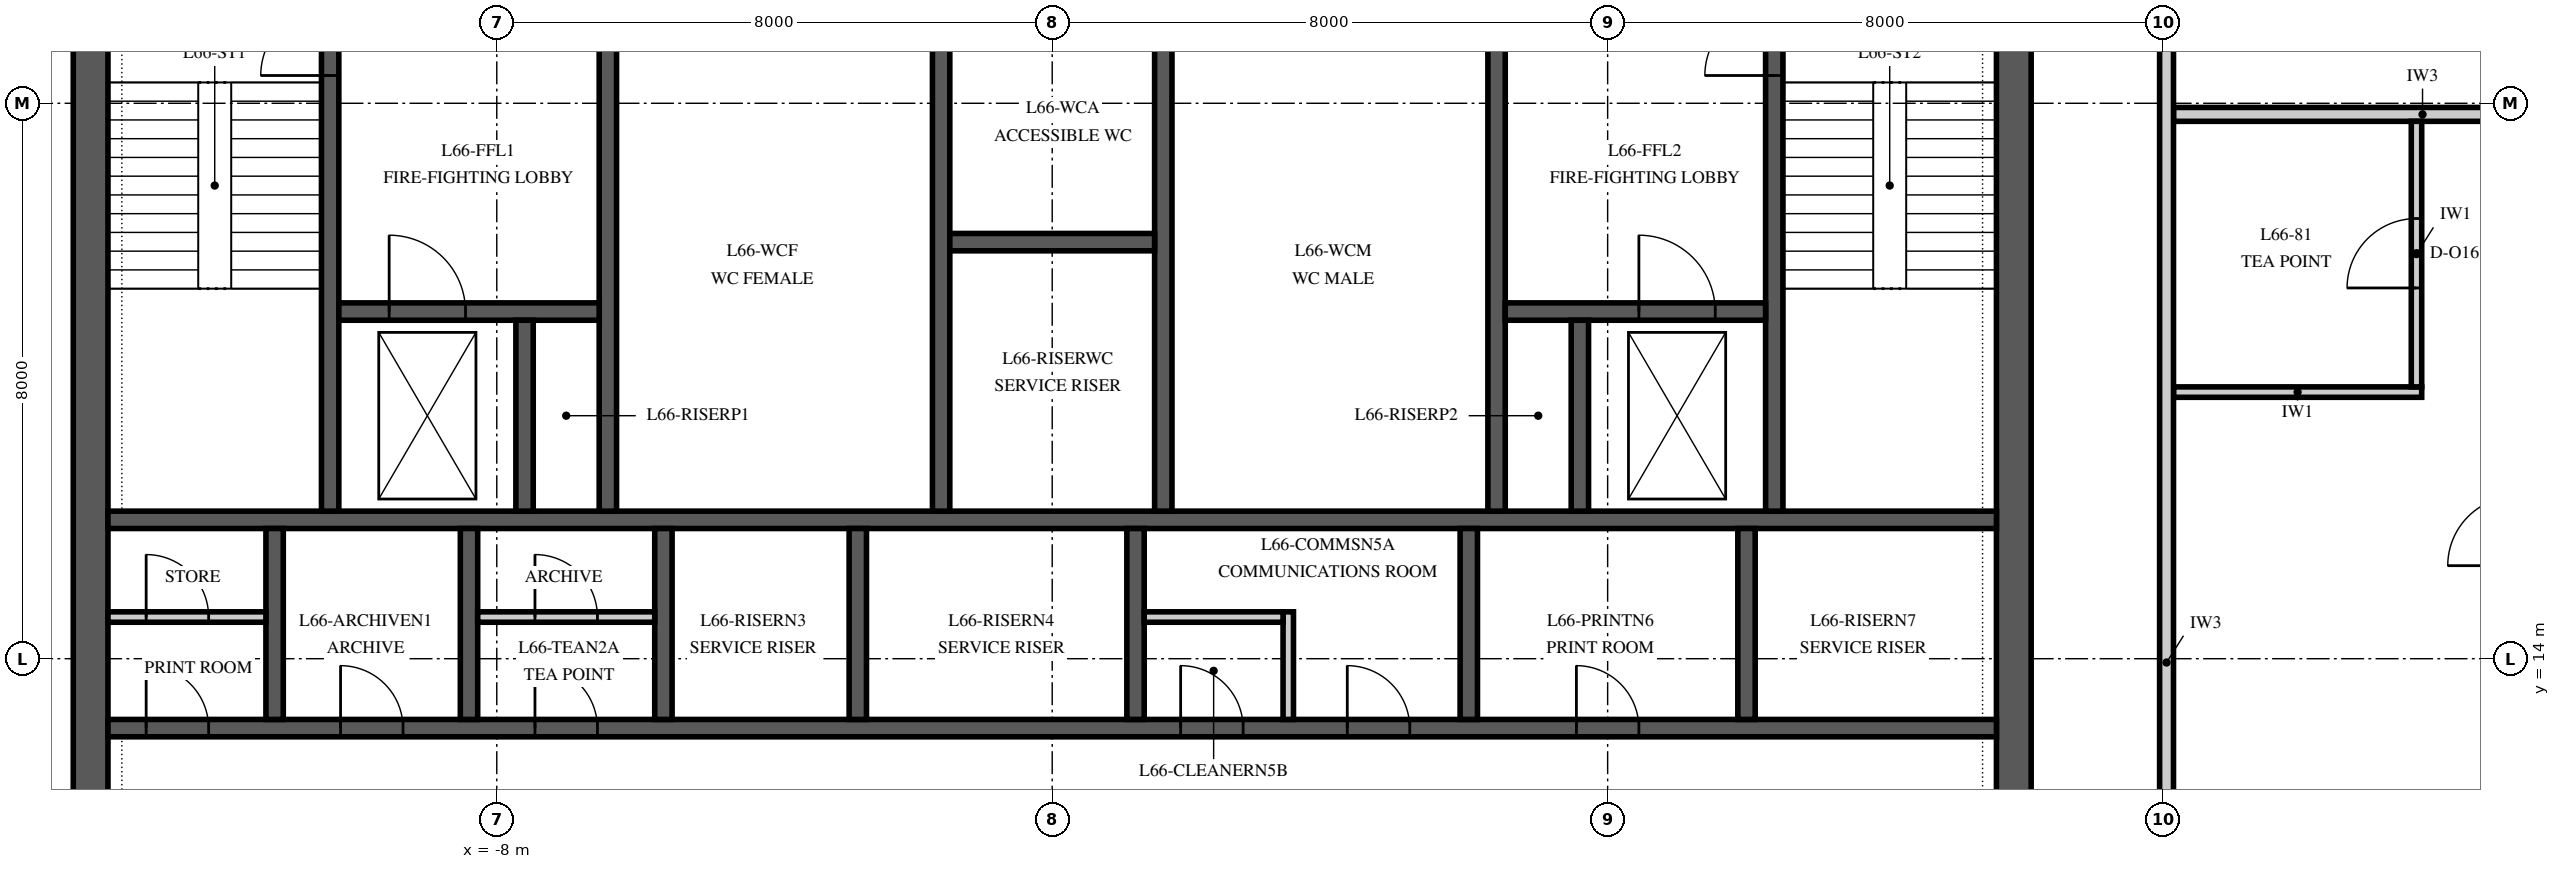
"""IFC4 building model, lengths in metres.
Left out: names, types, materials, properties, quantities, classifications, styles, units other than length and angle.
Written with IfcOpenShell. Run it as: python <this file> out.ifc"""

import sys

from ifc_helpers import new_model, si_unit, direction, frame, frame_2d, origin, place, context, subcontext, project, spatial, polyline, rectangle, outline, extrude, element, fill, save


model = new_model("IFC4")
c1 = context("Model", 3, precision=1e-05, world=origin(), true_north=direction((0.0, 1.0)))
c2 = subcontext(c1, "Body", "Model", "MODEL_VIEW")
j1 = project(units=[si_unit("LENGTHUNIT", "METRE"), si_unit("PLANEANGLEUNIT", "RADIAN")], contexts=[c1])
p1 = place(None, origin())
s1 = spatial("IfcSite", under=j1, at=p1, CompositionType="ELEMENT")
p2 = place(p1, origin())
s2 = spatial("IfcBuilding", under=s1, at=p2, CompositionType="ELEMENT")
p3 = place(p2, frame((0.0, 0.0, 284.0)))
s3 = spatial("IfcBuildingStorey", under=s2, at=p3, CompositionType="ELEMENT", Elevation=284.0)
p4 = place(p3, frame((13.85, 6.15, 0.0), z_axis=(0.0, 0.0, 1.0), x_axis=(0.0, 1.0, 0.0)))
e1 = element("IfcWall", 1, at=p4, inside=s3, PredefinedType="SHEAR", context=c2, shape_type="SweptSolid", body=[
    extrude(outline(polyline([(0.0, -0.25), (17.7, -0.25), (17.7, 0.0), (17.45, 0.0), (17.45, 0.25), (0.25, 0.25), (0.25, 0.0), (0.0, 0.0), (0.0, -0.25)])), origin(), (0.0, 0.0, 1.0), 4.0),
])
p5 = place(p4, frame((4.15, 0.0, 0.0)))
e2 = element("IfcOpeningElement", 2, at=p5, cuts=e1, PredefinedType="OPENING", context=c2, shape_type="SweptSolid", body=[
    extrude(rectangle(XDim=1.8, YDim=2.4, at=frame_2d((0.9, 1.2))), frame((0.0, 0.265, 0.0), z_axis=(0.0, -1.0, 0.0), x_axis=(1.0, 0.0, 0.0)), (0.0, 0.0, 1.0), 0.53),
])
p6 = place(p3, frame((-13.85, 23.85, 0.0), z_axis=(0.0, 0.0, 1.0), x_axis=(0.0, -1.0, 0.0)))
e3 = element("IfcWall", 3, at=p6, inside=s3, PredefinedType="SHEAR", context=c2, shape_type="SweptSolid", body=[
    extrude(outline(polyline([(0.0, -0.25), (17.7, -0.25), (17.7, 0.0), (17.45, 0.0), (17.45, 0.25), (0.25, 0.25), (0.25, 0.0), (0.0, 0.0), (0.0, -0.25)])), origin(), (0.0, 0.0, 1.0), 4.0),
])
p7 = place(p6, frame((11.75, 0.0, 0.0)))
e4 = element("IfcOpeningElement", 4, at=p7, cuts=e3, PredefinedType="OPENING", context=c2, shape_type="SweptSolid", body=[
    extrude(rectangle(XDim=1.8, YDim=2.4, at=frame_2d((0.9, 1.2))), frame((0.0, 0.265, 0.0), z_axis=(0.0, -1.0, 0.0), x_axis=(1.0, 0.0, 0.0)), (0.0, 0.0, 1.0), 0.53),
])
p8 = place(p3, frame((-13.6, 13.0, 0.0), z_axis=(0.0, 0.0, 1.0), x_axis=(1.0, 0.0, 0.0)))
e5 = element("IfcWall", 5, at=p8, inside=s3, PredefinedType="SHEAR", context=c2, shape_type="SweptSolid", body=[
    extrude(rectangle(XDim=27.2, YDim=0.25, at=frame_2d((13.6, 0.0))), origin(), (0.0, 0.0, 1.0), 4.0),
])
p9 = place(p8, frame((17.85, 0.0, 0.0)))
e6 = element("IfcOpeningElement", 6, at=p9, cuts=e5, PredefinedType="OPENING", context=c2, shape_type="SweptSolid", body=[
    extrude(rectangle(XDim=0.9, YDim=2.1, at=frame_2d((0.45, 1.05))), frame((0.0, 0.14, 0.0), z_axis=(0.0, -1.0, 0.0), x_axis=(1.0, 0.0, 0.0)), (0.0, 0.0, 1.0), 0.28),
])
p10 = place(p8, frame((15.45, 0.0, 0.0)))
e7 = element("IfcOpeningElement", 7, at=p10, cuts=e5, PredefinedType="OPENING", context=c2, shape_type="SweptSolid", body=[
    extrude(rectangle(XDim=0.9, YDim=2.1, at=frame_2d((0.45, 1.05))), frame((0.0, 0.14, 0.0), z_axis=(0.0, -1.0, 0.0), x_axis=(1.0, 0.0, 0.0)), (0.0, 0.0, 1.0), 0.28),
])
p11 = place(p8, frame((21.15, 0.0, 0.0)))
e8 = element("IfcOpeningElement", 8, at=p11, cuts=e5, PredefinedType="OPENING", context=c2, shape_type="SweptSolid", body=[
    extrude(rectangle(XDim=0.9, YDim=2.1, at=frame_2d((0.45, 1.05))), frame((0.0, 0.14, 0.0), z_axis=(0.0, -1.0, 0.0), x_axis=(1.0, 0.0, 0.0)), (0.0, 0.0, 1.0), 0.28),
])
p12 = place(p8, frame((0.55, 0.0, 0.0)))
e9 = element("IfcOpeningElement", 9, at=p12, cuts=e5, PredefinedType="OPENING", context=c2, shape_type="SweptSolid", body=[
    extrude(rectangle(XDim=0.9, YDim=2.1, at=frame_2d((0.45, 1.05))), frame((0.0, 0.14, 0.0), z_axis=(0.0, -1.0, 0.0), x_axis=(1.0, 0.0, 0.0)), (0.0, 0.0, 1.0), 0.28),
])
p13 = place(p8, frame((3.35, 0.0, 0.0)))
e10 = element("IfcOpeningElement", 10, at=p13, cuts=e5, PredefinedType="OPENING", context=c2, shape_type="SweptSolid", body=[
    extrude(rectangle(XDim=0.9, YDim=2.1, at=frame_2d((0.45, 1.05))), frame((0.0, 0.14, 0.0), z_axis=(0.0, -1.0, 0.0), x_axis=(1.0, 0.0, 0.0)), (0.0, 0.0, 1.0), 0.28),
])
p14 = place(p8, frame((6.15, 0.0, 0.0)))
e11 = element("IfcOpeningElement", 11, at=p14, cuts=e5, PredefinedType="OPENING", context=c2, shape_type="SweptSolid", body=[
    extrude(rectangle(XDim=0.9, YDim=2.1, at=frame_2d((0.45, 1.05))), frame((0.0, 0.14, 0.0), z_axis=(0.0, -1.0, 0.0), x_axis=(1.0, 0.0, 0.0)), (0.0, 0.0, 1.0), 0.28),
])
p15 = place(p3, frame((-13.6, 16.0, 0.0), z_axis=(0.0, 0.0, 1.0), x_axis=(1.0, 0.0, 0.0)))
e12 = element("IfcWall", 12, at=p15, inside=s3, PredefinedType="SHEAR", context=c2, shape_type="SweptSolid", body=[
    extrude(rectangle(XDim=27.2, YDim=0.25, at=frame_2d((13.6, 0.0))), origin(), (0.0, 0.0, 1.0), 4.0),
])
for number, where, z_axis, x_axis in (
    (13, (-11.2, 13.125, 0.0), (0.0, 0.0, 1.0), (0.0, 1.0, 0.0)),
    (14, (-8.4, 13.125, 0.0), (0.0, 0.0, 1.0), (0.0, 1.0, 0.0)),
    (15, (-5.6, 13.125, 0.0), (0.0, 0.0, 1.0), (0.0, 1.0, 0.0)),
    (16, (-2.8, 13.125, 0.0), (0.0, 0.0, 1.0), (0.0, 1.0, 0.0)),
    (17, (1.2, 13.125, 0.0), (0.0, 0.0, 1.0), (0.0, 1.0, 0.0)),
    (18, (6.0, 13.125, 0.0), (0.0, 0.0, 1.0), (0.0, 1.0, 0.0)),
    (19, (10.0, 13.125, 0.0), (0.0, 0.0, 1.0), (0.0, 1.0, 0.0)),
):
    element("IfcWall", number, at=place(p3, frame(where, z_axis=z_axis, x_axis=x_axis)), inside=s3, PredefinedType="SHEAR", context=c2, shape_type="SweptSolid", body=[
        extrude(rectangle(XDim=2.75, YDim=0.25, at=frame_2d((1.375, 0.0))), origin(), (0.0, 0.0, 1.0), 4.0),
    ])
p16 = place(p3, frame((-10.4, 16.125, 0.0), z_axis=(0.0, 0.0, 1.0), x_axis=(0.0, 1.0, 0.0)))
e20 = element("IfcWall", 20, at=p16, inside=s3, PredefinedType="SHEAR", context=c2, shape_type="SweptSolid", body=[
    extrude(rectangle(XDim=7.475, YDim=0.25, at=frame_2d((3.738, 0.0))), origin(), (0.0, 0.0, 1.0), 4.0),
])
p17 = place(p16, frame((6.275, 0.0, 0.0)))
e21 = element("IfcOpeningElement", 21, at=p17, cuts=e20, PredefinedType="OPENING", context=c2, shape_type="SweptSolid", body=[
    extrude(rectangle(XDim=1.0, YDim=2.1, at=frame_2d((0.5, 1.05))), frame((0.0, 0.14, 0.0), z_axis=(0.0, -1.0, 0.0), x_axis=(1.0, 0.0, 0.0)), (0.0, 0.0, 1.0), 0.28),
])
for number, where, z_axis, x_axis in (
    (22, (-6.4, 16.125, 0.0), (0.0, 0.0, 1.0), (0.0, 1.0, 0.0)),
    (23, (-1.6, 16.125, 0.0), (0.0, 0.0, 1.0), (0.0, 1.0, 0.0)),
    (24, (1.6, 16.125, 0.0), (0.0, 0.0, 1.0), (0.0, 1.0, 0.0)),
    (25, (6.4, 16.125, 0.0), (0.0, 0.0, 1.0), (0.0, 1.0, 0.0)),
):
    element("IfcWall", number, at=place(p3, frame(where, z_axis=z_axis, x_axis=x_axis)), inside=s3, PredefinedType="SHEAR", context=c2, shape_type="SweptSolid", body=[
        extrude(rectangle(XDim=7.475, YDim=0.25, at=frame_2d((3.738, 0.0))), origin(), (0.0, 0.0, 1.0), 4.0),
    ])
p18 = place(p3, frame((10.4, 16.125, 0.0), z_axis=(0.0, 0.0, 1.0), x_axis=(0.0, 1.0, 0.0)))
e26 = element("IfcWall", 26, at=p18, inside=s3, PredefinedType="SHEAR", context=c2, shape_type="SweptSolid", body=[
    extrude(rectangle(XDim=7.475, YDim=0.25, at=frame_2d((3.738, 0.0))), origin(), (0.0, 0.0, 1.0), 4.0),
])
p19 = place(p18, frame((6.275, 0.0, 0.0)))
e27 = element("IfcOpeningElement", 27, at=p19, cuts=e26, PredefinedType="OPENING", context=c2, shape_type="SweptSolid", body=[
    extrude(rectangle(XDim=1.0, YDim=2.1, at=frame_2d((0.5, 1.05))), frame((0.0, 0.14, 0.0), z_axis=(0.0, -1.0, 0.0), x_axis=(1.0, 0.0, 0.0)), (0.0, 0.0, 1.0), 0.28),
])
p20 = place(p3, frame((-10.275, 19.0, 0.0), z_axis=(0.0, 0.0, 1.0), x_axis=(1.0, 0.0, 0.0)))
e28 = element("IfcWall", 28, at=p20, inside=s3, PredefinedType="SHEAR", context=c2, shape_type="SweptSolid", body=[
    extrude(rectangle(XDim=3.75, YDim=0.25, at=frame_2d((1.875, 0.0))), origin(), (0.0, 0.0, 1.0), 4.0),
])
p21 = place(p20, frame((0.725, 0.0, 0.0)))
e29 = element("IfcOpeningElement", 29, at=p21, cuts=e28, PredefinedType="OPENING", context=c2, shape_type="SweptSolid", body=[
    extrude(rectangle(XDim=1.1, YDim=2.1, at=frame_2d((0.55, 1.05))), frame((0.0, 0.14, 0.0), z_axis=(0.0, -1.0, 0.0), x_axis=(1.0, 0.0, 0.0)), (0.0, 0.0, 1.0), 0.28),
])
p22 = place(p3, frame((6.525, 19.0, 0.0), z_axis=(0.0, 0.0, 1.0), x_axis=(1.0, 0.0, 0.0)))
e30 = element("IfcWall", 30, at=p22, inside=s3, PredefinedType="SHEAR", context=c2, shape_type="SweptSolid", body=[
    extrude(rectangle(XDim=3.75, YDim=0.25, at=frame_2d((1.875, 0.0))), origin(), (0.0, 0.0, 1.0), 4.0),
])
p23 = place(p22, frame((1.925, 0.0, 0.0)))
e31 = element("IfcOpeningElement", 31, at=p23, cuts=e30, PredefinedType="OPENING", context=c2, shape_type="SweptSolid", body=[
    extrude(rectangle(XDim=1.1, YDim=2.1, at=frame_2d((0.55, 1.05))), frame((0.0, 0.14, 0.0), z_axis=(0.0, -1.0, 0.0), x_axis=(1.0, 0.0, 0.0)), (0.0, 0.0, 1.0), 0.28),
])
for number, where, z_axis, x_axis in (
    (32, (-7.6, 16.125, 0.0), (0.0, 0.0, 1.0), (0.0, 1.0, 0.0)),
    (33, (7.6, 16.125, 0.0), (0.0, 0.0, 1.0), (0.0, 1.0, 0.0)),
):
    element("IfcWall", number, at=place(p3, frame(where, z_axis=z_axis, x_axis=x_axis)), inside=s3, PredefinedType="SHEAR", context=c2, shape_type="SweptSolid", body=[
        extrude(rectangle(XDim=2.75, YDim=0.25, at=frame_2d((1.375, 0.0))), origin(), (0.0, 0.0, 1.0), 4.0),
    ])
p24 = place(p3, frame((-1.475, 20.0, 0.0), z_axis=(0.0, 0.0, 1.0), x_axis=(1.0, 0.0, 0.0)))
e34 = element("IfcWall", 34, at=p24, inside=s3, PredefinedType="SHEAR", context=c2, shape_type="SweptSolid", body=[
    extrude(rectangle(XDim=2.95, YDim=0.25, at=frame_2d((1.475, 0.0))), origin(), (0.0, 0.0, 1.0), 4.0),
])
p25 = place(p3, frame((3.4, 13.125, 0.0), z_axis=(0.0, 0.0, 1.0), x_axis=(0.0, 1.0, 0.0)))
e35 = element("IfcWall", 35, at=p25, inside=s3, PredefinedType="PARTITIONING", context=c2, shape_type="SweptSolid", body=[
    extrude(rectangle(XDim=1.55, YDim=0.15, at=frame_2d((0.775, 0.0))), origin(), (0.0, 0.0, 1.0), 3.85),
])
p26 = place(p3, frame((1.325, 14.6, 0.0), z_axis=(0.0, 0.0, 1.0), x_axis=(1.0, 0.0, 0.0)))
e36 = element("IfcWall", 36, at=p26, inside=s3, PredefinedType="PARTITIONING", context=c2, shape_type="SweptSolid", body=[
    extrude(rectangle(XDim=2.0, YDim=0.15, at=frame_2d((1.0, 0.0))), origin(), (0.0, 0.0, 1.0), 3.85),
])
p27 = place(p3, frame((-13.6, 14.6, 0.0), z_axis=(0.0, 0.0, 1.0), x_axis=(1.0, 0.0, 0.0)))
e37 = element("IfcWall", 37, at=p27, inside=s3, PredefinedType="PARTITIONING", context=c2, shape_type="SweptSolid", body=[
    extrude(rectangle(XDim=2.275, YDim=0.15, at=frame_2d((1.138, 0.0))), origin(), (0.0, 0.0, 1.0), 3.85),
])
p28 = place(p27, frame((0.55, 0.0, 0.0)))
e38 = element("IfcOpeningElement", 38, at=p28, cuts=e37, PredefinedType="OPENING", context=c2, shape_type="SweptSolid", body=[
    extrude(rectangle(XDim=0.9, YDim=2.1, at=frame_2d((0.45, 1.05))), frame((0.0, 0.09, 0.0), z_axis=(0.0, -1.0, 0.0), x_axis=(1.0, 0.0, 0.0)), (0.0, 0.0, 1.0), 0.18),
])
p29 = place(p3, frame((-8.275, 14.6, 0.0), z_axis=(0.0, 0.0, 1.0), x_axis=(1.0, 0.0, 0.0)))
e39 = element("IfcWall", 39, at=p29, inside=s3, PredefinedType="PARTITIONING", context=c2, shape_type="SweptSolid", body=[
    extrude(rectangle(XDim=2.55, YDim=0.15, at=frame_2d((1.275, 0.0))), origin(), (0.0, 0.0, 1.0), 3.85),
])
p30 = place(p29, frame((0.825, 0.0, 0.0)))
e40 = element("IfcOpeningElement", 40, at=p30, cuts=e39, PredefinedType="OPENING", context=c2, shape_type="SweptSolid", body=[
    extrude(rectangle(XDim=0.9, YDim=2.1, at=frame_2d((0.45, 1.05))), frame((0.0, 0.09, 0.0), z_axis=(0.0, -1.0, 0.0), x_axis=(1.0, 0.0, 0.0)), (0.0, 0.0, 1.0), 0.18),
])
p31 = place(p3, frame((16.15, 17.84, 0.0), z_axis=(0.0, 0.0, 1.0), x_axis=(1.0, 0.0, 0.0)))
e41 = element("IfcWall", 41, at=p31, inside=s3, PredefinedType="PARTITIONING", context=c2, shape_type="SweptSolid", body=[
    extrude(rectangle(XDim=3.575, YDim=0.15, at=frame_2d((1.788, 0.0))), origin(), (0.0, 0.0, 1.0), 3.23),
])
p32 = place(p3, frame((16.15, 21.84, 0.0), z_axis=(0.0, 0.0, 1.0), x_axis=(1.0, 0.0, 0.0)))
e42 = element("IfcWall", 42, at=p32, inside=s3, PredefinedType="PARTITIONING", context=c2, shape_type="SweptSolid", body=[
    extrude(rectangle(XDim=7.174, YDim=0.2, at=frame_2d((3.587, 0.0))), origin(), (0.0, 0.0, 1.0), 3.23),
])
p33 = place(p3, frame((16.05, 1.94, 0.0), z_axis=(0.0, 0.0, 1.0), x_axis=(0.0, 1.0, 0.0)))
e43 = element("IfcWall", 43, at=p33, inside=s3, PredefinedType="PARTITIONING", context=c2, shape_type="SweptSolid", body=[
    extrude(rectangle(XDim=24.01, YDim=0.2, at=frame_2d((12.005, 0.0))), origin(), (0.0, 0.0, 1.0), 2.842),
])
p34 = place(p33, frame((8.46, 0.0, 0.0)))
e44 = element("IfcOpeningElement", 44, at=p34, cuts=e43, PredefinedType="OPENING", context=c2, shape_type="SweptSolid", body=[
    extrude(rectangle(XDim=1.2, YDim=2.4, at=frame_2d((0.6, 1.2))), frame((0.0, 0.115, 0.0), z_axis=(0.0, -1.0, 0.0), x_axis=(1.0, 0.0, 0.0)), (0.0, 0.0, 1.0), 0.23),
])
p35 = place(p33, frame((22.46, 0.0, 0.0)))
e45 = element("IfcOpeningElement", 45, at=p35, cuts=e43, PredefinedType="OPENING", context=c2, shape_type="SweptSolid", body=[
    extrude(rectangle(XDim=1.2, YDim=2.4, at=frame_2d((0.6, 1.2))), frame((0.0, 0.115, 0.0), z_axis=(0.0, -1.0, 0.0), x_axis=(1.0, 0.0, 0.0)), (0.0, 0.0, 1.0), 0.23),
])
p36 = place(p3, frame((19.65, 17.915, 0.0), z_axis=(0.0, 0.0, 1.0), x_axis=(0.0, 1.0, 0.0)))
e46 = element("IfcWall", 46, at=p36, inside=s3, PredefinedType="PARTITIONING", context=c2, shape_type="SweptSolid", body=[
    extrude(rectangle(XDim=3.825, YDim=0.15, at=frame_2d((1.913, 0.0))), origin(), (0.0, 0.0, 1.0), 3.23),
])
p37 = place(p36, frame((1.425, 0.0, 0.0)))
e47 = element("IfcOpeningElement", 47, at=p37, cuts=e46, PredefinedType="OPENING", context=c2, shape_type="SweptSolid", body=[
    extrude(rectangle(XDim=1.0, YDim=2.3, at=frame_2d((0.5, 1.15))), frame((0.0, 0.09, 0.0), z_axis=(0.0, -1.0, 0.0), x_axis=(1.0, 0.0, 0.0)), (0.0, 0.0, 1.0), 0.18),
])
p38 = place(p17, origin())
e48 = element("IfcDoor", 48, at=p38, inside=s3, OperationType="SINGLE_SWING_LEFT", PredefinedType="DOOR", context=c2, shape_type="SweptSolid", body=[
    extrude(rectangle(XDim=1.0, YDim=2.1, at=frame_2d((0.5, 1.05))), frame((0.0, 0.125, 0.0), z_axis=(0.0, -1.0, 0.0), x_axis=(1.0, 0.0, 0.0)), (0.0, 0.0, 1.0), 0.25),
])
fill(e21, e48)
p39 = place(p19, origin())
e49 = element("IfcDoor", 49, at=p39, inside=s3, OperationType="SINGLE_SWING_LEFT", PredefinedType="DOOR", context=c2, shape_type="SweptSolid", body=[
    extrude(rectangle(XDim=1.0, YDim=2.1, at=frame_2d((0.5, 1.05))), frame((0.0, 0.125, 0.0), z_axis=(0.0, -1.0, 0.0), x_axis=(1.0, 0.0, 0.0)), (0.0, 0.0, 1.0), 0.25),
])
fill(e27, e49)
p40 = place(p23, origin())
e50 = element("IfcDoor", 50, at=p40, inside=s3, OperationType="SLIDING_TO_RIGHT", PredefinedType="DOOR", context=c2, shape_type="SweptSolid", body=[
    extrude(rectangle(XDim=1.1, YDim=2.1, at=frame_2d((0.55, 1.05))), frame((0.0, 0.125, 0.0), z_axis=(0.0, -1.0, 0.0), x_axis=(1.0, 0.0, 0.0)), (0.0, 0.0, 1.0), 0.25),
])
fill(e31, e50)
p41 = place(p21, origin())
e51 = element("IfcDoor", 51, at=p41, inside=s3, OperationType="SLIDING_TO_RIGHT", PredefinedType="DOOR", context=c2, shape_type="SweptSolid", body=[
    extrude(rectangle(XDim=1.1, YDim=2.1, at=frame_2d((0.55, 1.05))), frame((0.0, 0.125, 0.0), z_axis=(0.0, -1.0, 0.0), x_axis=(1.0, 0.0, 0.0)), (0.0, 0.0, 1.0), 0.25),
])
fill(e29, e51)
p42 = place(p9, origin())
e52 = element("IfcDoor", 52, at=p42, inside=s3, OperationType="SINGLE_SWING_LEFT", PredefinedType="DOOR", context=c2, shape_type="SweptSolid", body=[
    extrude(rectangle(XDim=0.9, YDim=2.1, at=frame_2d((0.45, 1.05))), frame((0.0, 0.125, 0.0), z_axis=(0.0, -1.0, 0.0), x_axis=(1.0, 0.0, 0.0)), (0.0, 0.0, 1.0), 0.25),
])
fill(e6, e52)
p43 = place(p10, origin())
e53 = element("IfcDoor", 53, at=p43, inside=s3, OperationType="SINGLE_SWING_LEFT", PredefinedType="DOOR", context=c2, shape_type="SweptSolid", body=[
    extrude(rectangle(XDim=0.9, YDim=2.1, at=frame_2d((0.45, 1.05))), frame((0.0, 0.125, 0.0), z_axis=(0.0, -1.0, 0.0), x_axis=(1.0, 0.0, 0.0)), (0.0, 0.0, 1.0), 0.25),
])
fill(e7, e53)
p44 = place(p11, origin())
e54 = element("IfcDoor", 54, at=p44, inside=s3, OperationType="SINGLE_SWING_LEFT", PredefinedType="DOOR", context=c2, shape_type="SweptSolid", body=[
    extrude(rectangle(XDim=0.9, YDim=2.1, at=frame_2d((0.45, 1.05))), frame((0.0, 0.125, 0.0), z_axis=(0.0, -1.0, 0.0), x_axis=(1.0, 0.0, 0.0)), (0.0, 0.0, 1.0), 0.25),
])
fill(e8, e54)
p45 = place(p12, origin())
e55 = element("IfcDoor", 55, at=p45, inside=s3, OperationType="SINGLE_SWING_LEFT", PredefinedType="DOOR", context=c2, shape_type="SweptSolid", body=[
    extrude(rectangle(XDim=0.9, YDim=2.1, at=frame_2d((0.45, 1.05))), frame((0.0, 0.125, 0.0), z_axis=(0.0, -1.0, 0.0), x_axis=(1.0, 0.0, 0.0)), (0.0, 0.0, 1.0), 0.25),
])
fill(e9, e55)
p46 = place(p28, origin())
e56 = element("IfcDoor", 56, at=p46, inside=s3, OperationType="SINGLE_SWING_LEFT", PredefinedType="DOOR", context=c2, shape_type="SweptSolid", body=[
    extrude(rectangle(XDim=0.9, YDim=2.1, at=frame_2d((0.45, 1.05))), frame((0.0, 0.075, 0.0), z_axis=(0.0, -1.0, 0.0), x_axis=(1.0, 0.0, 0.0)), (0.0, 0.0, 1.0), 0.149),
])
fill(e38, e56)
p47 = place(p13, origin())
e57 = element("IfcDoor", 57, at=p47, inside=s3, OperationType="SINGLE_SWING_LEFT", PredefinedType="DOOR", context=c2, shape_type="SweptSolid", body=[
    extrude(rectangle(XDim=0.9, YDim=2.1, at=frame_2d((0.45, 1.05))), frame((0.0, 0.125, 0.0), z_axis=(0.0, -1.0, 0.0), x_axis=(1.0, 0.0, 0.0)), (0.0, 0.0, 1.0), 0.25),
])
fill(e10, e57)
p48 = place(p14, origin())
e58 = element("IfcDoor", 58, at=p48, inside=s3, OperationType="SINGLE_SWING_LEFT", PredefinedType="DOOR", context=c2, shape_type="SweptSolid", body=[
    extrude(rectangle(XDim=0.9, YDim=2.1, at=frame_2d((0.45, 1.05))), frame((0.0, 0.125, 0.0), z_axis=(0.0, -1.0, 0.0), x_axis=(1.0, 0.0, 0.0)), (0.0, 0.0, 1.0), 0.25),
])
fill(e11, e58)
p49 = place(p30, origin())
e59 = element("IfcDoor", 59, at=p49, inside=s3, OperationType="SINGLE_SWING_LEFT", PredefinedType="DOOR", context=c2, shape_type="SweptSolid", body=[
    extrude(rectangle(XDim=0.9, YDim=2.1, at=frame_2d((0.45, 1.05))), frame((0.0, 0.075, 0.0), z_axis=(0.0, -1.0, 0.0), x_axis=(1.0, 0.0, 0.0)), (0.0, 0.0, 1.0), 0.149),
])
fill(e40, e59)
p50 = place(p37, origin())
e60 = element("IfcDoor", 60, at=p50, inside=s3, OperationType="SINGLE_SWING_LEFT", PredefinedType="DOOR", context=c2, shape_type="SweptSolid", body=[
    extrude(rectangle(XDim=1.0, YDim=2.3, at=frame_2d((0.5, 1.15))), frame((0.0, 0.075, 0.0), z_axis=(0.0, -1.0, 0.0), x_axis=(1.0, 0.0, 0.0)), (0.0, 0.0, 1.0), 0.149),
])
fill(e47, e60)
save(model, sys.argv[1])
